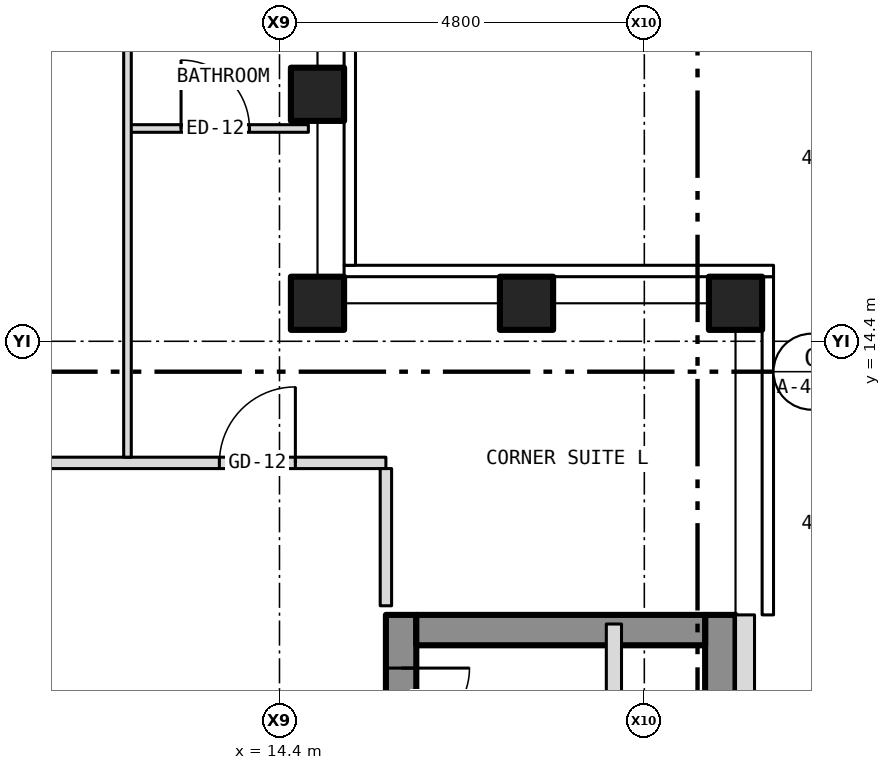
"""IFC4 building model, lengths in metres.
Left out: names, types, materials, properties, quantities, classifications, styles, units other than length and angle.
Written with IfcOpenShell. Run it as: python <this file> out.ifc"""

import sys

from ifc_helpers import new_model, si_unit, direction, frame, frame_2d, origin, origin_2d, place, context, subcontext, project, spatial, rectangle, hollow_rectangle, extrude, element, fill, save


model = new_model("IFC4")
c1 = context("Model", 3, precision=1e-05, world=origin(), true_north=direction((0.0, 1.0)))
c2 = subcontext(c1, "Body", "Model", "MODEL_VIEW")
j1 = project(units=[si_unit("LENGTHUNIT", "METRE"), si_unit("PLANEANGLEUNIT", "RADIAN")], contexts=[c1])
p1 = place(None, origin())
s1 = spatial("IfcSite", under=j1, at=p1, CompositionType="ELEMENT")
p2 = place(p1, origin())
s2 = spatial("IfcBuilding", under=s1, at=p2, CompositionType="ELEMENT")
p3 = place(p2, frame((0.0, 0.0, 198.0)))
s3 = spatial("IfcBuildingStorey", under=s2, at=p3, CompositionType="ELEMENT", Elevation=198.0)
for number, where, z_axis, x_axis in (
    (1, (20.4, 14.9, -0.15), (0.0, 0.0, 1.0), (1.0, 0.0, 0.0)),
    (2, (14.9, 14.9, -0.15), (0.0, 0.0, 1.0), (1.0, 0.0, 0.0)),
    (3, (14.9, 17.65, -0.15), (0.0, 0.0, 1.0), (1.0, 0.0, 0.0)),
    (4, (17.65, 14.9, -0.15), (0.0, 0.0, 1.0), (1.0, 0.0, 0.0)),
):
    element("IfcColumn", number, at=place(p3, frame(where, z_axis=z_axis, x_axis=x_axis)), inside=s3, PredefinedType="COLUMN", context=c2, shape_type="SweptSolid", body=[
        extrude(hollow_rectangle(XDim=0.7, YDim=0.7, WallThickness=0.04, at=origin_2d()), origin(), (0.0, 0.0, 1.0), 3.5),
    ])
p4 = place(p3, frame((16.0, -10.8, 0.0), z_axis=(0.0, 0.0, 1.0), x_axis=(0.0, 1.0, 0.0)))
e5 = element("IfcWall", 5, at=p4, inside=s3, PredefinedType="SHEAR", context=c2, shape_type="SweptSolid", body=[
    extrude(rectangle(XDim=21.6, YDim=0.4, at=frame_2d((10.8, 0.0))), origin(), (0.0, 0.0, 1.0), 3.25),
])
p5 = place(p4, frame((9.4, 0.0, 0.0)))
e6 = element("IfcOpeningElement", 6, at=p5, cuts=e5, PredefinedType="OPENING", context=c2, shape_type="SweptSolid", body=[
    extrude(rectangle(XDim=1.1, YDim=2.1, at=frame_2d((0.55, 1.05))), frame((0.0, 0.212, 0.0), z_axis=(0.0, -1.0, 0.0), x_axis=(1.0, 0.0, 0.0)), (0.0, 0.0, 1.0), 0.424),
])
p6 = place(p4, frame((11.5, 0.0, 0.0)))
e7 = element("IfcOpeningElement", 7, at=p6, cuts=e5, PredefinedType="OPENING", context=c2, shape_type="SweptSolid", body=[
    extrude(rectangle(XDim=1.1, YDim=2.1, at=frame_2d((0.55, 1.05))), frame((0.0, 0.212, 0.0), z_axis=(0.0, -1.0, 0.0), x_axis=(1.0, 0.0, 0.0)), (0.0, 0.0, 1.0), 0.424),
])
p7 = place(p4, frame((13.6, 0.0, 0.0)))
e8 = element("IfcOpeningElement", 8, at=p7, cuts=e5, PredefinedType="OPENING", context=c2, shape_type="SweptSolid", body=[
    extrude(rectangle(XDim=1.1, YDim=2.1, at=frame_2d((0.55, 1.05))), frame((0.0, 0.212, 0.0), z_axis=(0.0, -1.0, 0.0), x_axis=(1.0, 0.0, 0.0)), (0.0, 0.0, 1.0), 0.424),
])
p8 = place(p4, frame((15.7, 0.0, 0.0)))
e9 = element("IfcOpeningElement", 9, at=p8, cuts=e5, PredefinedType="OPENING", context=c2, shape_type="SweptSolid", body=[
    extrude(rectangle(XDim=1.1, YDim=2.1, at=frame_2d((0.55, 1.05))), frame((0.0, 0.212, 0.0), z_axis=(0.0, -1.0, 0.0), x_axis=(1.0, 0.0, 0.0)), (0.0, 0.0, 1.0), 0.424),
])
p9 = place(p4, frame((17.8, 0.0, 0.0)))
e10 = element("IfcOpeningElement", 10, at=p9, cuts=e5, PredefinedType="OPENING", context=c2, shape_type="SweptSolid", body=[
    extrude(rectangle(XDim=1.1, YDim=2.1, at=frame_2d((0.55, 1.05))), frame((0.0, 0.212, 0.0), z_axis=(0.0, -1.0, 0.0), x_axis=(1.0, 0.0, 0.0)), (0.0, 0.0, 1.0), 0.424),
])
p10 = place(p4, frame((5.642, 0.0, 0.0)))
e11 = element("IfcOpeningElement", 11, at=p10, cuts=e5, PredefinedType="OPENING", context=c2, shape_type="SweptSolid", body=[
    extrude(rectangle(XDim=1.1, YDim=2.1, at=frame_2d((0.55, 1.05))), frame((0.0, 0.212, 0.0), z_axis=(0.0, -1.0, 0.0), x_axis=(1.0, 0.0, 0.0)), (0.0, 0.0, 1.0), 0.424),
])
p11 = place(p4, frame((7.5, 0.0, 0.0)))
e12 = element("IfcOpeningElement", 12, at=p11, cuts=e5, PredefinedType="OPENING", context=c2, shape_type="SweptSolid", body=[
    extrude(rectangle(XDim=1.1, YDim=2.1, at=frame_2d((0.55, 1.05))), frame((0.0, 0.212, 0.0), z_axis=(0.0, -1.0, 0.0), x_axis=(1.0, 0.0, 0.0)), (0.0, 0.0, 1.0), 0.424),
])
p12 = place(p4, frame((20.0, 0.0, 0.0)))
e13 = element("IfcOpeningElement", 13, at=p12, cuts=e5, PredefinedType="OPENING", context=c2, shape_type="SweptSolid", body=[
    extrude(rectangle(XDim=0.9, YDim=2.1, at=frame_2d((0.45, 1.05))), frame((0.0, 0.212, 0.0), z_axis=(0.0, -1.0, 0.0), x_axis=(1.0, 0.0, 0.0)), (0.0, 0.0, 1.0), 0.424),
])
p13 = place(p3, frame((20.2, -10.8, 0.0), z_axis=(0.0, 0.0, 1.0), x_axis=(0.0, 1.0, 0.0)))
e14 = element("IfcWall", 14, at=p13, inside=s3, PredefinedType="SHEAR", context=c2, shape_type="SweptSolid", body=[
    extrude(rectangle(XDim=21.6, YDim=0.4, at=frame_2d((10.8, 0.0))), origin(), (0.0, 0.0, 1.0), 3.25),
])
p14 = place(p3, frame((16.2, 10.6, 0.0), z_axis=(0.0, 0.0, 1.0), x_axis=(1.0, 0.0, 0.0)))
e15 = element("IfcWall", 15, at=p14, inside=s3, PredefinedType="SHEAR", context=c2, shape_type="SweptSolid", body=[
    extrude(rectangle(XDim=3.8, YDim=0.4, at=frame_2d((1.9, 0.0))), origin(), (0.0, 0.0, 1.0), 3.25),
])
p15 = place(p3, frame((20.525, -10.8, 0.0), z_axis=(0.0, 0.0, 1.0), x_axis=(0.0, 1.0, 0.0)))
e16 = element("IfcWall", 16, at=p15, inside=s3, PredefinedType="SOLIDWALL", context=c2, shape_type="SweptSolid", body=[
    extrude(rectangle(XDim=21.6, YDim=0.25, at=frame_2d((10.8, 0.0))), origin(), (0.0, 0.0, 1.0), 3.5),
])
p16 = place(p15, frame((2.95, 0.0, 1.0)))
e17 = element("IfcOpeningElement", 17, at=p16, cuts=e16, PredefinedType="OPENING", context=c2, shape_type="SweptSolid", body=[
    extrude(rectangle(XDim=0.6, YDim=1.5, at=frame_2d((0.3, 0.75))), frame((0.0, 0.137, 0.0), z_axis=(0.0, -1.0, 0.0), x_axis=(1.0, 0.0, 0.0)), (0.0, 0.0, 1.0), 0.274),
])
p17 = place(p3, frame((-15.8, 12.8, 0.0), z_axis=(0.0, 0.0, 1.0), x_axis=(1.0, 0.0, 0.0)))
e18 = element("IfcWall", 18, at=p17, inside=s3, PredefinedType="PARTITIONING", context=c2, shape_type="SweptSolid", body=[
    extrude(rectangle(XDim=31.6, YDim=0.15, at=frame_2d((15.8, 0.0))), origin(), (0.0, 0.0, 1.0), 3.35),
])
p18 = place(p17, frame((4.267, 0.0, 0.0)))
e19 = element("IfcOpeningElement", 19, at=p18, cuts=e18, PredefinedType="OPENING", context=c2, shape_type="SweptSolid", body=[
    extrude(rectangle(XDim=1.0, YDim=2.1, at=frame_2d((0.5, 1.05))), frame((0.0, 0.087, 0.0), z_axis=(0.0, -1.0, 0.0), x_axis=(1.0, 0.0, 0.0)), (0.0, 0.0, 1.0), 0.174),
])
p19 = place(p17, frame((12.675, 0.0, 0.0)))
e20 = element("IfcOpeningElement", 20, at=p19, cuts=e18, PredefinedType="OPENING", context=c2, shape_type="SweptSolid", body=[
    extrude(rectangle(XDim=1.0, YDim=2.1, at=frame_2d((0.5, 1.05))), frame((0.0, 0.087, 0.0), z_axis=(0.0, -1.0, 0.0), x_axis=(1.0, 0.0, 0.0)), (0.0, 0.0, 1.0), 0.174),
])
p20 = place(p17, frame((16.684, 0.0, 0.0)))
e21 = element("IfcOpeningElement", 21, at=p20, cuts=e18, PredefinedType="OPENING", context=c2, shape_type="SweptSolid", body=[
    extrude(rectangle(XDim=1.0, YDim=2.1, at=frame_2d((0.5, 1.05))), frame((0.0, 0.087, 0.0), z_axis=(0.0, -1.0, 0.0), x_axis=(1.0, 0.0, 0.0)), (0.0, 0.0, 1.0), 0.174),
])
p21 = place(p17, frame((25.092, 0.0, 0.0)))
e22 = element("IfcOpeningElement", 22, at=p21, cuts=e18, PredefinedType="OPENING", context=c2, shape_type="SweptSolid", body=[
    extrude(rectangle(XDim=1.0, YDim=2.1, at=frame_2d((0.5, 1.05))), frame((0.0, 0.087, 0.0), z_axis=(0.0, -1.0, 0.0), x_axis=(1.0, 0.0, 0.0)), (0.0, 0.0, 1.0), 0.174),
])
p22 = place(p17, frame((1.192, 0.0, 0.0)))
e23 = element("IfcOpeningElement", 23, at=p22, cuts=e18, PredefinedType="OPENING", context=c2, shape_type="SweptSolid", body=[
    extrude(rectangle(XDim=1.0, YDim=2.1, at=frame_2d((0.5, 1.05))), frame((0.0, 0.087, 0.0), z_axis=(0.0, -1.0, 0.0), x_axis=(1.0, 0.0, 0.0)), (0.0, 0.0, 1.0), 0.174),
])
p23 = place(p17, frame((29.409, 0.0, 0.0)))
e24 = element("IfcOpeningElement", 24, at=p23, cuts=e18, PredefinedType="OPENING", context=c2, shape_type="SweptSolid", body=[
    extrude(rectangle(XDim=1.0, YDim=2.1, at=frame_2d((0.5, 1.05))), frame((0.0, 0.087, 0.0), z_axis=(0.0, -1.0, 0.0), x_axis=(1.0, 0.0, 0.0)), (0.0, 0.0, 1.0), 0.174),
])
p24 = place(p3, frame((12.4, 17.2, 0.0), z_axis=(0.0, 0.0, 1.0), x_axis=(1.0, 0.0, 0.0)))
e25 = element("IfcWall", 25, at=p24, inside=s3, PredefinedType="PARTITIONING", context=c2, shape_type="SweptSolid", body=[
    extrude(rectangle(XDim=2.38, YDim=0.1, at=frame_2d((1.19, 0.0))), origin(), (0.0, 0.0, 1.0), 3.35),
])
p25 = place(p24, frame((0.705, 0.0, 0.0)))
e26 = element("IfcOpeningElement", 26, at=p25, cuts=e25, PredefinedType="OPENING", context=c2, shape_type="SweptSolid", body=[
    extrude(rectangle(XDim=0.9, YDim=2.1, at=frame_2d((0.45, 1.05))), frame((0.0, 0.062, 0.0), z_axis=(0.0, -1.0, 0.0), x_axis=(1.0, 0.0, 0.0)), (0.0, 0.0, 1.0), 0.124),
])
p26 = place(p3, frame((12.4, 12.875, 0.0), z_axis=(0.0, 0.0, 1.0), x_axis=(0.0, 1.0, 0.0)))
e27 = element("IfcWall", 27, at=p26, inside=s3, PredefinedType="PARTITIONING", context=c2, shape_type="SweptSolid", body=[
    extrude(rectangle(XDim=7.905, YDim=0.1, at=frame_2d((3.953, 0.0))), origin(), (0.0, 0.0, 1.0), 3.35),
])
p27 = place(p3, frame((15.8, 10.92, 0.0), z_axis=(0.0, 0.0, 1.0), x_axis=(0.0, 1.0, 0.0)))
e28 = element("IfcWall", 28, at=p27, inside=s3, PredefinedType="PARTITIONING", context=c2, shape_type="SweptSolid", body=[
    extrude(rectangle(XDim=1.805, YDim=0.15, at=frame_2d((0.903, 0.0))), origin(), (0.0, 0.0, 1.0), 3.35),
])
p28 = place(p3, frame((18.8, -1.8, 0.0), z_axis=(0.0, 0.0, 1.0), x_axis=(0.0, 1.0, 0.0)))
e29 = element("IfcWall", 29, at=p28, inside=s3, PredefinedType="PARTITIONING", context=c2, shape_type="SweptSolid", body=[
    extrude(rectangle(XDim=12.48, YDim=0.2, at=frame_2d((6.24, 0.0))), origin(), (0.0, 0.0, 1.0), 3.25),
])
p29 = place(p12, origin())
e30 = element("IfcDoor", 30, at=p29, inside=s3, OperationType="SINGLE_SWING_RIGHT", PredefinedType="DOOR", context=c2, shape_type="SweptSolid", body=[
    extrude(rectangle(XDim=0.9, YDim=2.1, at=frame_2d((0.45, 1.05))), frame((0.0, 0.025, 0.0), z_axis=(0.0, -1.0, 0.0), x_axis=(1.0, 0.0, 0.0)), (0.0, 0.0, 1.0), 0.05),
])
fill(e13, e30)
p30 = place(p25, origin())
e31 = element("IfcDoor", 31, at=p30, inside=s3, OperationType="SINGLE_SWING_LEFT", PredefinedType="DOOR", context=c2, shape_type="SweptSolid", body=[
    extrude(rectangle(XDim=0.9, YDim=2.1, at=frame_2d((0.45, 1.05))), frame((0.0, 0.025, 0.0), z_axis=(0.0, -1.0, 0.0), x_axis=(1.0, 0.0, 0.0)), (0.0, 0.0, 1.0), 0.05),
])
fill(e26, e31)
p31 = place(p23, origin())
e32 = element("IfcDoor", 32, at=p31, inside=s3, OperationType="SINGLE_SWING_RIGHT", PredefinedType="DOOR", context=c2, shape_type="SweptSolid", body=[
    extrude(rectangle(XDim=1.0, YDim=2.1, at=frame_2d((0.5, 1.05))), frame((0.0, 0.025, 0.0), z_axis=(0.0, -1.0, 0.0), x_axis=(1.0, 0.0, 0.0)), (0.0, 0.0, 1.0), 0.05),
])
fill(e24, e32)
save(model, sys.argv[1])
